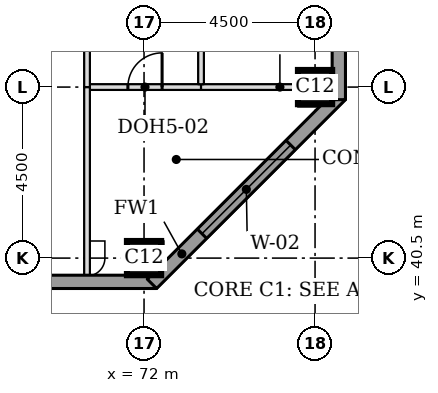
"""IFC4 building model, lengths in metres.
Left out: names, types, materials, properties, quantities, classifications, styles, units other than length and angle.
Written with IfcOpenShell. Run it as: python <this file> out.ifc"""

import sys

from ifc_helpers import new_model, si_unit, direction, frame, frame_2d, origin, origin_2d, place, context, subcontext, project, spatial, rectangle, extrude, element, fill, save


model = new_model("IFC4")
c1 = context("Model", 3, precision=1e-05, world=origin(), true_north=direction((0.0, 1.0)))
c2 = subcontext(c1, "Body", "Model", "MODEL_VIEW")
j1 = project(units=[si_unit("LENGTHUNIT", "METRE"), si_unit("PLANEANGLEUNIT", "RADIAN")], contexts=[c1])
p1 = place(None, origin())
s1 = spatial("IfcSite", under=j1, at=p1, CompositionType="ELEMENT")
p2 = place(p1, origin())
s2 = spatial("IfcBuilding", under=s1, at=p2, CompositionType="ELEMENT")
p3 = place(p2, frame((0.0, 0.0, 177.3)))
s3 = spatial("IfcBuildingStorey", under=s2, at=p3, CompositionType="ELEMENT", Elevation=177.3)
for number, where, z_axis, x_axis in (
    (1, (72.0, 40.5, 0.0), (0.0, 0.0, 1.0), (1.0, 0.0, 0.0)),
    (2, (76.5, 45.0, 0.0), (0.0, 0.0, 1.0), (1.0, 0.0, 0.0)),
):
    element("IfcColumn", number, at=place(p3, frame(where, z_axis=z_axis, x_axis=x_axis)), inside=s3, PredefinedType="COLUMN", context=c2, shape_type="SweptSolid", body=[
        extrude(rectangle(XDim=0.9, YDim=0.9, at=origin_2d()), origin(), (0.0, 0.0, 1.0), 3.7),
    ])
p4 = place(p3, frame((36.0, 39.875, 0.0), z_axis=(0.0, 0.0, 1.0), x_axis=(1.0, 0.0, 0.0)))
e3 = element("IfcWall", 3, at=p4, inside=s3, PredefinedType="STANDARD", context=c2, shape_type="SweptSolid", body=[
    extrude(rectangle(XDim=36.331, YDim=0.35, at=frame_2d((18.166, 0.0))), origin(), (0.0, 0.0, 1.0), 3.525),
])
p5 = place(p4, frame((5.1, 0.0, 0.9)))
e4 = element("IfcOpeningElement", 4, at=p5, cuts=e3, PredefinedType="OPENING", context=c2, shape_type="SweptSolid", body=[
    extrude(rectangle(XDim=3.3, YDim=1.9, at=frame_2d((1.65, 0.95))), frame((0.0, 0.185, 0.0), z_axis=(0.0, -1.0, 0.0), x_axis=(1.0, 0.0, 0.0)), (0.0, 0.0, 1.0), 0.37),
])
p6 = place(p4, frame((9.6, 0.0, 0.9)))
e5 = element("IfcOpeningElement", 5, at=p6, cuts=e3, PredefinedType="OPENING", context=c2, shape_type="SweptSolid", body=[
    extrude(rectangle(XDim=3.3, YDim=1.9, at=frame_2d((1.65, 0.95))), frame((0.0, 0.185, 0.0), z_axis=(0.0, -1.0, 0.0), x_axis=(1.0, 0.0, 0.0)), (0.0, 0.0, 1.0), 0.37),
])
p7 = place(p4, frame((14.1, 0.0, 0.9)))
e6 = element("IfcOpeningElement", 6, at=p7, cuts=e3, PredefinedType="OPENING", context=c2, shape_type="SweptSolid", body=[
    extrude(rectangle(XDim=3.3, YDim=1.9, at=frame_2d((1.65, 0.95))), frame((0.0, 0.185, 0.0), z_axis=(0.0, -1.0, 0.0), x_axis=(1.0, 0.0, 0.0)), (0.0, 0.0, 1.0), 0.37),
])
p8 = place(p4, frame((18.6, 0.0, 0.9)))
e7 = element("IfcOpeningElement", 7, at=p8, cuts=e3, PredefinedType="OPENING", context=c2, shape_type="SweptSolid", body=[
    extrude(rectangle(XDim=3.3, YDim=1.9, at=frame_2d((1.65, 0.95))), frame((0.0, 0.185, 0.0), z_axis=(0.0, -1.0, 0.0), x_axis=(1.0, 0.0, 0.0)), (0.0, 0.0, 1.0), 0.37),
])
p9 = place(p4, frame((23.1, 0.0, 0.9)))
e8 = element("IfcOpeningElement", 8, at=p9, cuts=e3, PredefinedType="OPENING", context=c2, shape_type="SweptSolid", body=[
    extrude(rectangle(XDim=3.3, YDim=1.9, at=frame_2d((1.65, 0.95))), frame((0.0, 0.185, 0.0), z_axis=(0.0, -1.0, 0.0), x_axis=(1.0, 0.0, 0.0)), (0.0, 0.0, 1.0), 0.37),
])
p10 = place(p4, frame((27.6, 0.0, 0.9)))
e9 = element("IfcOpeningElement", 9, at=p10, cuts=e3, PredefinedType="OPENING", context=c2, shape_type="SweptSolid", body=[
    extrude(rectangle(XDim=3.3, YDim=1.9, at=frame_2d((1.65, 0.95))), frame((0.0, 0.185, 0.0), z_axis=(0.0, -1.0, 0.0), x_axis=(1.0, 0.0, 0.0)), (0.0, 0.0, 1.0), 0.37),
])
p11 = place(p3, frame((72.208, 39.824, 0.0), z_axis=(0.0, 0.0, 1.0), x_axis=(0.707106781187, 0.707106781187, 0.0)))
e10 = element("IfcWall", 10, at=p11, inside=s3, PredefinedType="STANDARD", context=c2, shape_type="SweptSolid", body=[
    extrude(rectangle(XDim=7.027, YDim=0.35, at=frame_2d((3.513, 0.0))), origin(), (0.0, 0.0, 1.0), 3.525),
])
p12 = place(p11, frame((1.863, 0.0, 0.9)))
e11 = element("IfcOpeningElement", 11, at=p12, cuts=e10, PredefinedType="OPENING", context=c2, shape_type="SweptSolid", body=[
    extrude(rectangle(XDim=3.3, YDim=1.9, at=frame_2d((1.65, 0.95))), frame((0.0, 0.185, 0.0), z_axis=(0.0, -1.0, 0.0), x_axis=(1.0, 0.0, 0.0)), (0.0, 0.0, 1.0), 0.37),
])
p13 = place(p3, frame((77.125, 44.669, 0.0), z_axis=(0.0, 0.0, 1.0), x_axis=(0.0, 1.0, 0.0)))
e12 = element("IfcWall", 12, at=p13, inside=s3, PredefinedType="STANDARD", context=c2, shape_type="SweptSolid", body=[
    extrude(rectangle(XDim=32.163, YDim=0.35, at=frame_2d((16.081, 0.0))), origin(), (0.0, 0.0, 1.0), 3.525),
])
p14 = place(p13, frame((5.431, 0.0, 0.9)))
e13 = element("IfcOpeningElement", 13, at=p14, cuts=e12, PredefinedType="OPENING", context=c2, shape_type="SweptSolid", body=[
    extrude(rectangle(XDim=3.3, YDim=1.9, at=frame_2d((1.65, 0.95))), frame((0.0, 0.185, 0.0), z_axis=(0.0, -1.0, 0.0), x_axis=(1.0, 0.0, 0.0)), (0.0, 0.0, 1.0), 0.37),
])
p15 = place(p13, frame((9.931, 0.0, 0.9)))
e14 = element("IfcOpeningElement", 14, at=p15, cuts=e12, PredefinedType="OPENING", context=c2, shape_type="SweptSolid", body=[
    extrude(rectangle(XDim=3.3, YDim=1.9, at=frame_2d((1.65, 0.95))), frame((0.0, 0.185, 0.0), z_axis=(0.0, -1.0, 0.0), x_axis=(1.0, 0.0, 0.0)), (0.0, 0.0, 1.0), 0.37),
])
p16 = place(p13, frame((14.431, 0.0, 0.9)))
e15 = element("IfcOpeningElement", 15, at=p16, cuts=e12, PredefinedType="OPENING", context=c2, shape_type="SweptSolid", body=[
    extrude(rectangle(XDim=3.3, YDim=1.9, at=frame_2d((1.65, 0.95))), frame((0.0, 0.185, 0.0), z_axis=(0.0, -1.0, 0.0), x_axis=(1.0, 0.0, 0.0)), (0.0, 0.0, 1.0), 0.37),
])
p17 = place(p13, frame((18.931, 0.0, 0.9)))
e16 = element("IfcOpeningElement", 16, at=p17, cuts=e12, PredefinedType="OPENING", context=c2, shape_type="SweptSolid", body=[
    extrude(rectangle(XDim=3.3, YDim=1.9, at=frame_2d((1.65, 0.95))), frame((0.0, 0.185, 0.0), z_axis=(0.0, -1.0, 0.0), x_axis=(1.0, 0.0, 0.0)), (0.0, 0.0, 1.0), 0.37),
])
p18 = place(p13, frame((23.431, 0.0, 0.9)))
e17 = element("IfcOpeningElement", 17, at=p18, cuts=e12, PredefinedType="OPENING", context=c2, shape_type="SweptSolid", body=[
    extrude(rectangle(XDim=3.3, YDim=1.9, at=frame_2d((1.65, 0.95))), frame((0.0, 0.185, 0.0), z_axis=(0.0, -1.0, 0.0), x_axis=(1.0, 0.0, 0.0)), (0.0, 0.0, 1.0), 0.37),
])
p19 = place(p3, frame((70.575, 45.0, 0.0), z_axis=(0.0, 0.0, 1.0), x_axis=(1.0, 0.0, 0.0)))
e18 = element("IfcWall", 18, at=p19, inside=s3, PredefinedType="PARTITIONING", context=c2, shape_type="SweptSolid", body=[
    extrude(rectangle(XDim=2.925, YDim=0.15, at=frame_2d((1.462, 0.0))), origin(), (0.0, 0.0, 1.0), 3.096),
])
p20 = place(p19, frame((1.0, 0.0, 0.0)))
e19 = element("IfcOpeningElement", 19, at=p20, cuts=e18, PredefinedType="OPENING", context=c2, shape_type="SweptSolid", body=[
    extrude(rectangle(XDim=0.9, YDim=2.1, at=frame_2d((0.45, 1.05))), frame((0.0, 0.085, 0.0), z_axis=(0.0, -1.0, 0.0), x_axis=(1.0, 0.0, 0.0)), (0.0, 0.0, 1.0), 0.17),
])
p21 = place(p3, frame((73.5, 45.0, 0.0), z_axis=(0.0, 0.0, 1.0), x_axis=(1.0, 0.0, 0.0)))
e20 = element("IfcWall", 20, at=p21, inside=s3, PredefinedType="PARTITIONING", context=c2, shape_type="SweptSolid", body=[
    extrude(rectangle(XDim=2.55, YDim=0.15, at=frame_2d((1.275, 0.0))), origin(), (0.0, 0.0, 1.0), 3.096),
])
p22 = place(p3, frame((70.5, 40.05, 0.0), z_axis=(0.0, 0.0, 1.0), x_axis=(0.0, 1.0, 0.0)))
e21 = element("IfcWall", 21, at=p22, inside=s3, PredefinedType="PARTITIONING", context=c2, shape_type="SweptSolid", body=[
    extrude(rectangle(XDim=4.95, YDim=0.15, at=frame_2d((2.475, 0.0))), origin(), (0.0, 0.0, 1.0), 3.55),
])
p23 = place(p3, frame((70.5, 45.0, 0.0), z_axis=(0.0, 0.0, 1.0), x_axis=(0.0, 1.0, 0.0)))
e22 = element("IfcWall", 22, at=p23, inside=s3, PredefinedType="PARTITIONING", context=c2, shape_type="SweptSolid", body=[
    extrude(rectangle(XDim=27.0, YDim=0.15, at=frame_2d((13.5, 0.0))), origin(), (0.0, 0.0, 1.0), 3.55),
])
p24 = place(p23, frame((13.0, 0.0, 0.0)))
e23 = element("IfcOpeningElement", 23, at=p24, cuts=e22, PredefinedType="OPENING", context=c2, shape_type="SweptSolid", body=[
    extrude(rectangle(XDim=1.0, YDim=2.1, at=frame_2d((0.5, 1.05))), frame((0.0, 0.085, 0.0), z_axis=(0.0, -1.0, 0.0), x_axis=(1.0, 0.0, 0.0)), (0.0, 0.0, 1.0), 0.17),
])
p25 = place(p3, frame((73.5, 45.075, 0.0), z_axis=(0.0, 0.0, 1.0), x_axis=(0.0, 1.0, 0.0)))
e24 = element("IfcWall", 24, at=p25, inside=s3, PredefinedType="PARTITIONING", context=c2, shape_type="SweptSolid", body=[
    extrude(rectangle(XDim=4.425, YDim=0.15, at=frame_2d((2.212, 0.0))), origin(), (0.0, 0.0, 1.0), 3.55),
])
p26 = place(p25, frame((1.75, 0.0, 0.0)))
e25 = element("IfcOpeningElement", 25, at=p26, cuts=e24, PredefinedType="OPENING", context=c2, shape_type="SweptSolid", body=[
    extrude(rectangle(XDim=0.9, YDim=2.1, at=frame_2d((0.45, 1.05))), frame((0.0, 0.085, 0.0), z_axis=(0.0, -1.0, 0.0), x_axis=(1.0, 0.0, 0.0)), (0.0, 0.0, 1.0), 0.17),
])
p27 = place(p12, origin())
e26 = element("IfcWindow", 26, at=p27, inside=s3, PartitioningType="SINGLE_PANEL", PredefinedType="WINDOW", context=c2, shape_type="SweptSolid", body=[
    extrude(rectangle(XDim=3.3, YDim=1.9, at=frame_2d((1.65, 0.95))), frame((0.0, 0.085, 0.0), z_axis=(0.0, -1.0, 0.0), x_axis=(1.0, 0.0, 0.0)), (0.0, 0.0, 1.0), 0.06),
])
fill(e11, e26)
p28 = place(p20, origin())
e27 = element("IfcDoor", 27, at=p28, inside=s3, OperationType="SINGLE_SWING_RIGHT", PredefinedType="DOOR", context=c2, shape_type="SweptSolid", body=[
    extrude(rectangle(XDim=0.9, YDim=2.1, at=frame_2d((0.45, 1.05))), frame((0.0, 0.025, 0.0), z_axis=(0.0, -1.0, 0.0), x_axis=(1.0, 0.0, 0.0)), (0.0, 0.0, 1.0), 0.05),
])
fill(e19, e27)
save(model, sys.argv[1])
